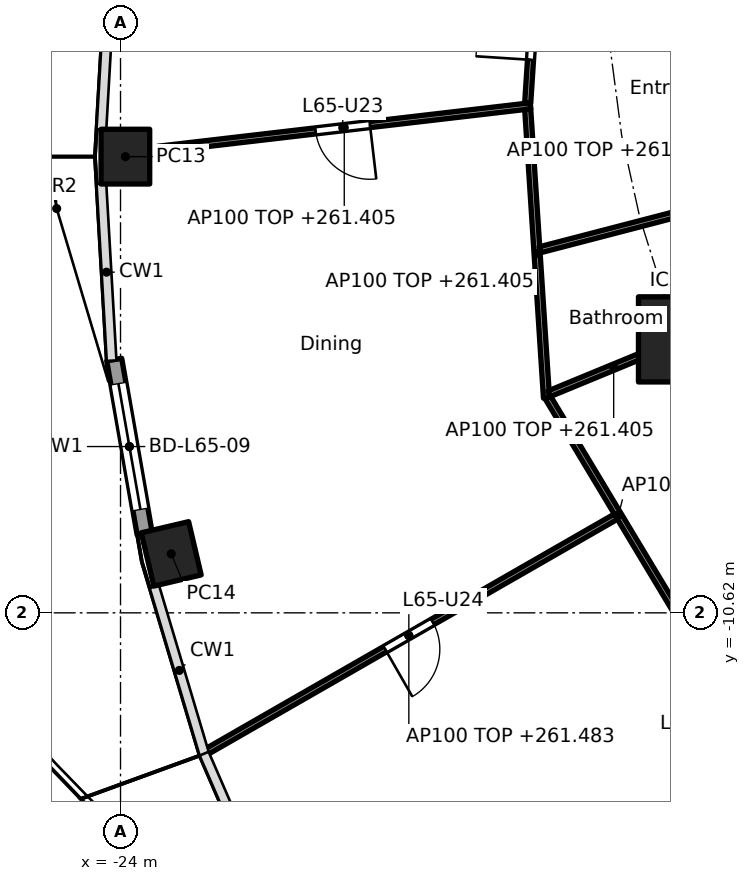
"""IFC4 building model, lengths in metres.
Left out: names, types, materials, properties, quantities, classifications, styles, units other than length and angle.
Written with IfcOpenShell. Run it as: python <this file> out.ifc"""

import sys

from ifc_helpers import new_model, si_unit, direction, frame, frame_2d, origin, origin_2d, place, context, subcontext, project, spatial, rectangle, hollow_rectangle, extrude, element, fill, save


model = new_model("IFC4")
c1 = context("Model", 3, precision=1e-05, world=origin(), true_north=direction((0.0, 1.0)))
c2 = subcontext(c1, "Body", "Model", "MODEL_VIEW")
j1 = project(units=[si_unit("LENGTHUNIT", "METRE"), si_unit("PLANEANGLEUNIT", "RADIAN")], contexts=[c1])
p1 = place(None, origin())
s1 = spatial("IfcSite", under=j1, at=p1, CompositionType="ELEMENT")
p2 = place(p1, origin())
s2 = spatial("IfcBuilding", under=s1, at=p2, CompositionType="ELEMENT")
p3 = place(p2, frame((0.0, 0.0, 258.5)))
s3 = spatial("IfcBuildingStorey", under=s2, at=p3, CompositionType="ELEMENT", Elevation=258.5)
for number, where, z_axis, x_axis in (
    (1, (-23.92, -3.118, -0.26), (0.0, 0.0, 1.0), (0.0, -1.0, 0.0)),
    (2, (-23.166, -9.65, -0.26), (0.0, 0.0, 1.0), (0.229, -0.973, 0.0)),
):
    element("IfcColumn", number, at=place(p3, frame(where, z_axis=z_axis, x_axis=x_axis)), inside=s3, PredefinedType="COLUMN", context=c2, shape_type="SweptSolid", body=[
        extrude(hollow_rectangle(XDim=0.9, YDim=0.8, WallThickness=0.028, at=origin_2d()), origin(), (0.0, 0.0, 1.0), 3.96),
    ])
p4 = place(p3, frame((-14.782, -6.123, 0.0), z_axis=(0.0, 0.0, 1.0), x_axis=(1.0, 0.0, 0.0)))
e3 = element("IfcColumn", 3, at=p4, inside=s3, PredefinedType="COLUMN", context=c2, shape_type="SweptSolid", body=[
    extrude(rectangle(XDim=1.4, YDim=1.4, at=origin_2d()), origin(), (0.0, 0.0, 1.0), 3.7),
])
p5 = place(p3, frame((-23.604, -9.315, 0.0), z_axis=(0.0, 0.0, 1.0), x_axis=(-0.172182411767, 0.985065082661, 0.0)))
e4 = element("IfcWall", 4, at=p5, inside=s3, PredefinedType="SOLIDWALL", context=c2, shape_type="SweptSolid", body=[
    extrude(rectangle(XDim=2.903, YDim=0.25, at=frame_2d((1.451, 0.0))), origin(), (0.0, 0.0, 1.0), 3.44),
])
p6 = place(p5, frame((0.401, 0.0, 0.0)))
e5 = element("IfcOpeningElement", 5, at=p6, cuts=e4, PredefinedType="OPENING", context=c2, shape_type="SweptSolid", body=[
    extrude(rectangle(XDim=2.1, YDim=2.4, at=frame_2d((1.05, 1.2))), frame((0.0, 0.135, 0.0), z_axis=(0.0, -1.0, 0.0), x_axis=(1.0, 0.0, 0.0)), (0.0, 0.0, 1.0), 0.27),
])
p7 = place(p3, frame((-17.002, 2.409, 0.0), z_axis=(0.0, 0.0, 1.0), x_axis=(-0.064855550758, -0.997894662545, 0.0)))
e6 = element("IfcWall", 6, at=p7, inside=s3, PredefinedType="PARTITIONING", context=c2, shape_type="SweptSolid", body=[
    extrude(rectangle(XDim=4.656, YDim=0.1, at=frame_2d((2.328, 0.0))), origin(), (0.0, 0.0, 1.0), 2.905),
])
p8 = place(p7, frame((3.042, 0.0, 0.0)))
e7 = element("IfcOpeningElement", 7, at=p8, cuts=e6, PredefinedType="OPENING", context=c2, shape_type="SweptSolid", body=[
    extrude(rectangle(XDim=0.9, YDim=2.1, at=frame_2d((0.45, 1.05))), frame((0.0, 0.06, 0.0), z_axis=(0.0, -1.0, 0.0), x_axis=(1.0, 0.0, 0.0)), (0.0, 0.0, 1.0), 0.12),
])
p9 = place(p3, frame((-17.257, -2.282, 0.0), z_axis=(0.0, 0.0, 1.0), x_axis=(-0.993266024162, -0.11585596767, 0.0)))
e8 = element("IfcWall", 8, at=p9, inside=s3, PredefinedType="PARTITIONING", context=c2, shape_type="SweptSolid", body=[
    extrude(rectangle(XDim=6.168, YDim=0.1, at=frame_2d((3.084, 0.0))), origin(), (0.0, 0.0, 1.0), 2.905),
])
p10 = place(p9, frame((2.659, 0.0, 0.0)))
e9 = element("IfcOpeningElement", 9, at=p10, cuts=e8, PredefinedType="OPENING", context=c2, shape_type="SweptSolid", body=[
    extrude(rectangle(XDim=0.9, YDim=2.1, at=frame_2d((0.45, 1.05))), frame((0.0, 0.06, 0.0), z_axis=(0.0, -1.0, 0.0), x_axis=(1.0, 0.0, 0.0)), (0.0, 0.0, 1.0), 0.12),
])
p11 = place(p3, frame((-17.304, -2.338, 0.0), z_axis=(0.0, 0.0, 1.0), x_axis=(0.065003615989, -0.997885028402, 0.0)))
e10 = element("IfcWall", 10, at=p11, inside=s3, PredefinedType="PARTITIONING", context=c2, shape_type="SweptSolid", body=[
    extrude(rectangle(XDim=4.759, YDim=0.1, at=frame_2d((2.379, 0.0))), origin(), (0.0, 0.0, 1.0), 2.905),
])
p12 = place(p3, frame((-12.662, -3.495, 0.0), z_axis=(0.0, 0.0, 1.0), x_axis=(-0.967834941053, -0.251586022817, 0.0)))
e11 = element("IfcWall", 11, at=p12, inside=s3, PredefinedType="PARTITIONING", context=c2, shape_type="SweptSolid", body=[
    extrude(rectangle(XDim=4.59, YDim=0.1, at=frame_2d((2.295, 0.0))), origin(), (0.0, 0.0, 1.0), 2.762),
])
p13 = place(p12, frame((0.5, 0.0, 0.0)))
e12 = element("IfcOpeningElement", 12, at=p13, cuts=e11, PredefinedType="OPENING", context=c2, shape_type="SweptSolid", body=[
    extrude(rectangle(XDim=0.9, YDim=2.1, at=frame_2d((0.45, 1.05))), frame((0.0, 0.06, 0.0), z_axis=(0.0, -1.0, 0.0), x_axis=(1.0, 0.0, 0.0)), (0.0, 0.0, 1.0), 0.12),
])
p14 = place(p3, frame((-14.828, -6.142, 0.0), z_axis=(0.0, 0.0, 1.0), x_axis=(-0.924479819749, -0.381230983627, 0.0)))
e13 = element("IfcWall", 13, at=p14, inside=s3, PredefinedType="PARTITIONING", context=c2, shape_type="SweptSolid", body=[
    extrude(rectangle(XDim=2.296, YDim=0.1, at=frame_2d((1.148, 0.0))), origin(), (0.0, 0.0, 1.0), 2.905),
])
p15 = place(p3, frame((-16.972, -7.08, 0.0), z_axis=(0.0, 0.0, 1.0), x_axis=(0.514989049311, -0.857196756346, 0.0)))
e14 = element("IfcWall", 14, at=p15, inside=s3, PredefinedType="PARTITIONING", context=c2, shape_type="SweptSolid", body=[
    extrude(rectangle(XDim=4.512, YDim=0.1, at=frame_2d((2.256, 0.0))), origin(), (0.0, 0.0, 1.0), 2.905),
])
p16 = place(p3, frame((-15.854, -9.038, 0.0), z_axis=(0.0, 0.0, 1.0), x_axis=(-0.867229230904, -0.497909089157, 0.0)))
e15 = element("IfcWall", 15, at=p16, inside=s3, PredefinedType="PARTITIONING", context=c2, shape_type="SweptSolid", body=[
    extrude(rectangle(XDim=7.853, YDim=0.1, at=frame_2d((3.926, 0.0))), origin(), (0.0, 0.0, 1.0), 2.983),
])
p17 = place(p16, frame((3.476, 0.0, 0.0)))
e16 = element("IfcOpeningElement", 16, at=p17, cuts=e15, PredefinedType="OPENING", context=c2, shape_type="SweptSolid", body=[
    extrude(rectangle(XDim=0.9, YDim=2.1, at=frame_2d((0.45, 1.05))), frame((0.0, 0.06, 0.0), z_axis=(0.0, -1.0, 0.0), x_axis=(1.0, 0.0, 0.0)), (0.0, 0.0, 1.0), 0.12),
])
p18 = place(p6, origin())
e17 = element("IfcDoor", 17, at=p18, inside=s3, OperationType="SLIDING_TO_LEFT", PredefinedType="DOOR", context=c2, shape_type="SweptSolid", body=[
    extrude(rectangle(XDim=2.1, YDim=2.4, at=frame_2d((1.05, 1.2))), frame((0.0, 0.025, 0.0), z_axis=(0.0, -1.0, 0.0), x_axis=(1.0, 0.0, 0.0)), (0.0, 0.0, 1.0), 0.05),
])
fill(e5, e17)
p19 = place(p8, frame((0.9, 0.0, 0.0), x_axis=(-1.0, 0.0, 0.0)))
e18 = element("IfcDoor", 18, at=p19, inside=s3, OperationType="SINGLE_SWING_LEFT", PredefinedType="DOOR", context=c2, shape_type="SweptSolid", body=[
    extrude(rectangle(XDim=0.9, YDim=2.1, at=frame_2d((0.45, 1.05))), frame((0.0, 0.025, 0.0), z_axis=(0.0, -1.0, 0.0), x_axis=(1.0, 0.0, 0.0)), (0.0, 0.0, 1.0), 0.05),
])
fill(e7, e18)
p20 = place(p10, origin())
e19 = element("IfcDoor", 19, at=p20, inside=s3, OperationType="SINGLE_SWING_LEFT", PredefinedType="DOOR", context=c2, shape_type="SweptSolid", body=[
    extrude(rectangle(XDim=0.9, YDim=2.1, at=frame_2d((0.45, 1.05))), frame((0.0, 0.025, 0.0), z_axis=(0.0, -1.0, 0.0), x_axis=(1.0, 0.0, 0.0)), (0.0, 0.0, 1.0), 0.05),
])
fill(e9, e19)
p21 = place(p17, origin())
e20 = element("IfcDoor", 20, at=p21, inside=s3, OperationType="SINGLE_SWING_RIGHT", PredefinedType="DOOR", context=c2, shape_type="SweptSolid", body=[
    extrude(rectangle(XDim=0.9, YDim=2.1, at=frame_2d((0.45, 1.05))), frame((0.0, 0.025, 0.0), z_axis=(0.0, -1.0, 0.0), x_axis=(1.0, 0.0, 0.0)), (0.0, 0.0, 1.0), 0.05),
])
fill(e16, e20)
save(model, sys.argv[1])
